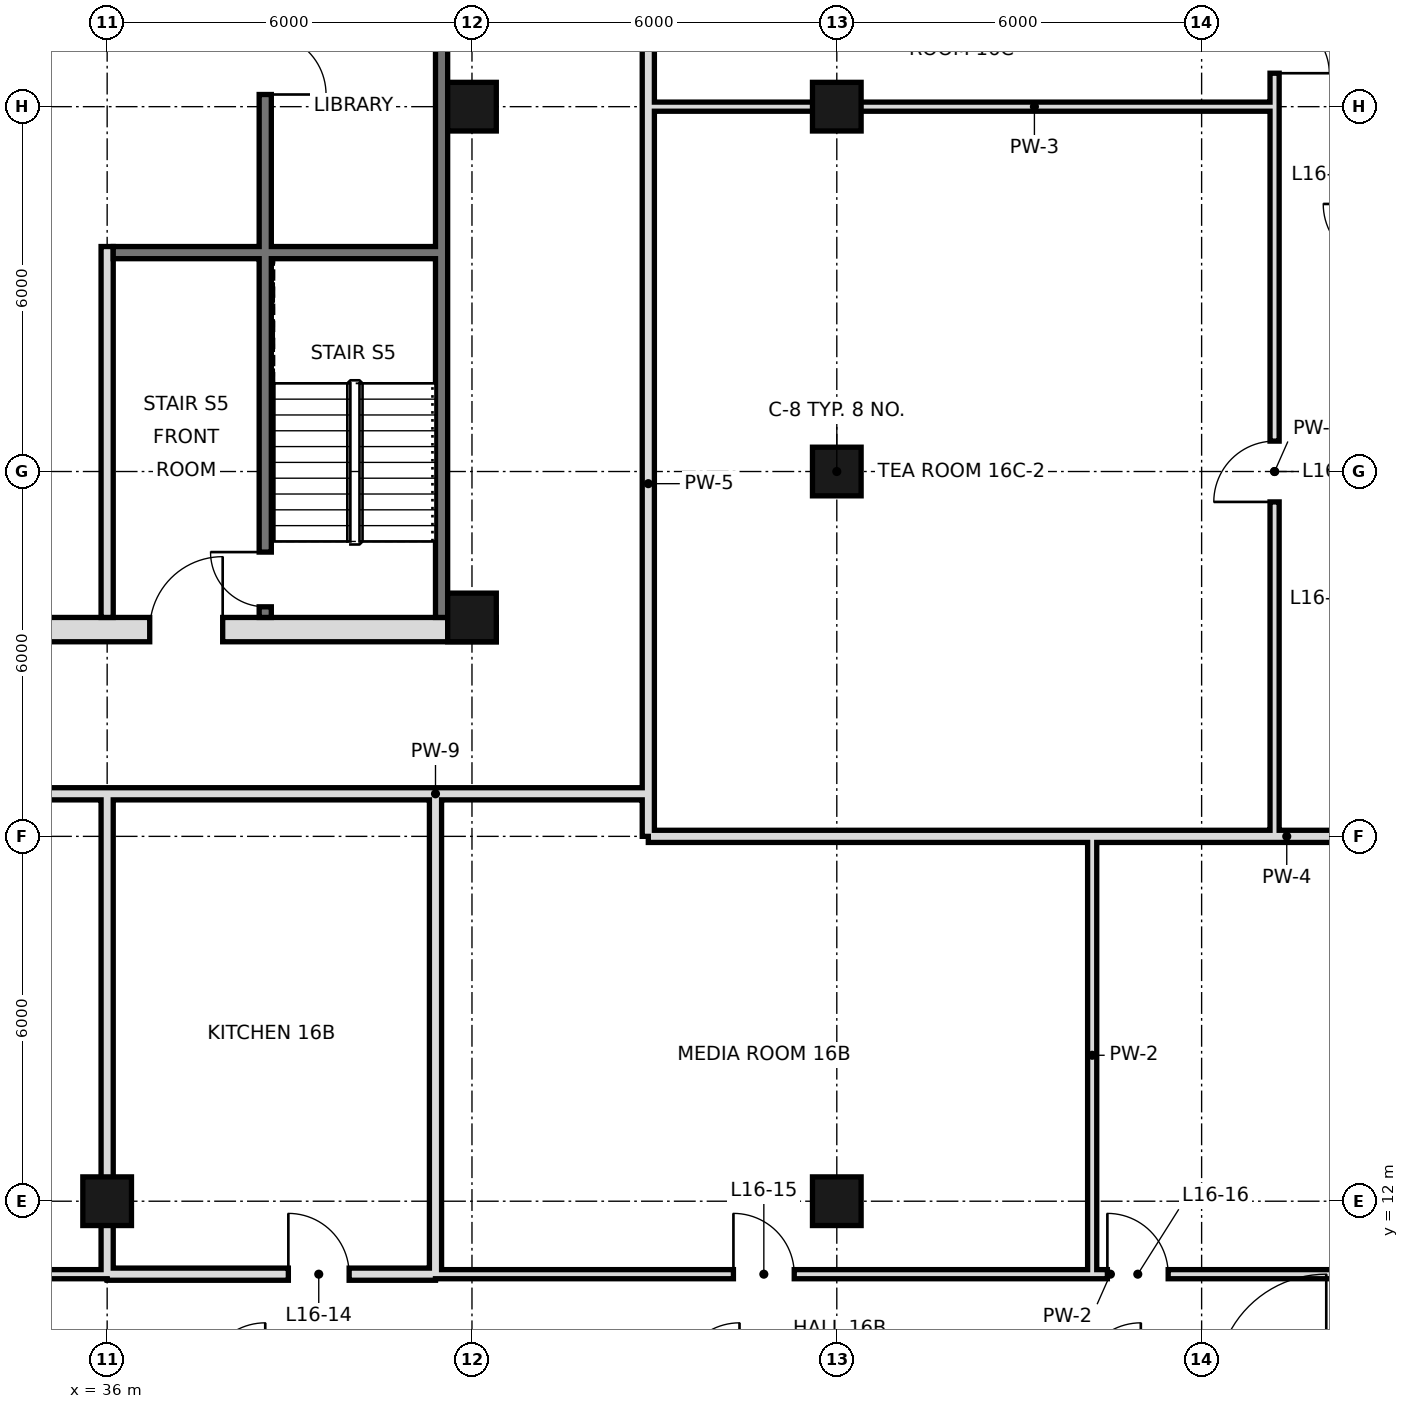
"""IFC4 building model, lengths in metres.
Left out: names, types, materials, properties, quantities, classifications, styles, units other than length and angle.
Written with IfcOpenShell. Run it as: python <this file> out.ifc"""

import sys

from ifc_helpers import new_model, si_unit, direction, frame, frame_2d, origin, origin_2d, place, context, subcontext, project, spatial, rectangle, hollow_rectangle, extrude, element, fill, save


model = new_model("IFC4")
c1 = context("Model", 3, precision=1e-05, world=origin(), true_north=direction((0.0, 1.0)))
c2 = subcontext(c1, "Body", "Model", "MODEL_VIEW")
j1 = project(units=[si_unit("LENGTHUNIT", "METRE"), si_unit("PLANEANGLEUNIT", "RADIAN")], contexts=[c1])
p1 = place(None, origin())
s1 = spatial("IfcSite", under=j1, at=p1, CompositionType="ELEMENT")
p2 = place(p1, origin())
s2 = spatial("IfcBuilding", under=s1, at=p2, CompositionType="ELEMENT")
p3 = place(p2, frame((0.0, 0.0, 78.6)))
s3 = spatial("IfcBuildingStorey", under=s2, at=p3, CompositionType="ELEMENT", Elevation=78.6)
p4 = place(p3, frame((36.0, 12.0, 0.0), z_axis=(0.0, 0.0, 1.0), x_axis=(1.0, 0.0, 0.0)))
e1 = element("IfcColumn", 1, at=p4, inside=s3, PredefinedType="COLUMN", context=c2, shape_type="SweptSolid", body=[
    extrude(hollow_rectangle(XDim=0.8, YDim=0.8, WallThickness=0.04, at=origin_2d()), origin(), (0.0, 0.0, 1.0), 3.6),
])
for number, where, z_axis, x_axis in (
    (2, (42.0, 21.6, 0.0), (0.0, 0.0, 1.0), (1.0, 0.0, 0.0)),
    (3, (42.0, 30.0, 0.0), (0.0, 0.0, 1.0), (1.0, 0.0, 0.0)),
):
    element("IfcColumn", number, at=place(p3, frame(where, z_axis=z_axis, x_axis=x_axis)), inside=s3, PredefinedType="COLUMN", context=c2, shape_type="SweptSolid", body=[
        extrude(hollow_rectangle(XDim=0.8, YDim=0.8, WallThickness=0.06, at=origin_2d()), origin(), (0.0, 0.0, 1.0), 3.6),
    ])
for number, where, z_axis, x_axis in (
    (4, (48.0, 12.0, 0.0), (0.0, 0.0, 1.0), (1.0, 0.0, 0.0)),
    (5, (48.0, 24.0, 0.0), (0.0, 0.0, 1.0), (1.0, 0.0, 0.0)),
    (6, (48.0, 30.0, 0.0), (0.0, 0.0, 1.0), (1.0, 0.0, 0.0)),
):
    element("IfcColumn", number, at=place(p3, frame(where, z_axis=z_axis, x_axis=x_axis)), inside=s3, PredefinedType="COLUMN", context=c2, shape_type="SweptSolid", body=[
        extrude(hollow_rectangle(XDim=0.8, YDim=0.8, WallThickness=0.04, at=origin_2d()), origin(), (0.0, 0.0, 1.0), 3.6),
    ])
for number, where, z_axis, x_axis in (
    (7, (36.0, 10.8, 0.0), (0.0, 0.0, 1.0), (0.0, 1.0, 0.0)),
    (8, (41.4, 10.8, 0.0), (0.0, 0.0, 1.0), (0.0, 1.0, 0.0)),
):
    element("IfcWall", number, at=place(p3, frame(where, z_axis=z_axis, x_axis=x_axis)), inside=s3, PredefinedType="SOLIDWALL", context=c2, shape_type="SweptSolid", body=[
        extrude(rectangle(XDim=7.9, YDim=0.2, at=frame_2d((3.95, 0.0))), origin(), (0.0, 0.0, 1.0), 2.72),
    ])
p5 = place(p3, frame((44.9, 18.7, 0.0), z_axis=(0.0, 0.0, 1.0), x_axis=(0.0, 1.0, 0.0)))
e9 = element("IfcWall", 9, at=p5, inside=s3, PredefinedType="SOLIDWALL", context=c2, shape_type="SweptSolid", body=[
    extrude(rectangle(XDim=13.7, YDim=0.2, at=frame_2d((6.85, 0.0))), origin(), (0.0, 0.0, 1.0), 2.97),
])
p6 = place(p3, frame((44.9, 18.0, 0.0), z_axis=(0.0, 0.0, 1.0), x_axis=(0.0, 1.0, 0.0)))
e10 = element("IfcWall", 10, at=p6, inside=s3, PredefinedType="SOLIDWALL", context=c2, shape_type="SweptSolid", body=[
    extrude(rectangle(XDim=0.7, YDim=0.2, at=frame_2d((0.35, 0.0))), origin(), (0.0, 0.0, 1.0), 2.97),
])
p7 = place(p3, frame((52.2, 10.8, 0.0), z_axis=(0.0, 0.0, 1.0), x_axis=(0.0, 1.0, 0.0)))
e11 = element("IfcWall", 11, at=p7, inside=s3, PredefinedType="PARTITIONING", context=c2, shape_type="SweptSolid", body=[
    extrude(rectangle(XDim=7.2, YDim=0.15, at=frame_2d((3.6, 0.0))), origin(), (0.0, 0.0, 1.0), 3.42),
])
p8 = place(p3, frame((55.2, 18.0, 0.0), z_axis=(0.0, 0.0, 1.0), x_axis=(0.0, 1.0, 0.0)))
e12 = element("IfcWall", 12, at=p8, inside=s3, PredefinedType="PARTITIONING", context=c2, shape_type="SweptSolid", body=[
    extrude(rectangle(XDim=12.0, YDim=0.15, at=frame_2d((6.0, 0.0))), origin(), (0.0, 0.0, 1.0), 3.42),
])
p9 = place(p8, frame((5.5, 0.0, 0.0)))
e13 = element("IfcOpeningElement", 13, at=p9, cuts=e12, PredefinedType="OPENING", context=c2, shape_type="SweptSolid", body=[
    extrude(rectangle(XDim=1.0, YDim=2.4, at=frame_2d((0.5, 1.2))), frame((0.0, 0.085, 0.0), z_axis=(0.0, -1.0, 0.0), x_axis=(1.0, 0.0, 0.0)), (0.0, 0.0, 1.0), 0.17),
])
p10 = place(p3, frame((55.2, 30.0, 0.0), z_axis=(0.0, 0.0, 1.0), x_axis=(0.0, 1.0, 0.0)))
e14 = element("IfcWall", 14, at=p10, inside=s3, PredefinedType="PARTITIONING", context=c2, shape_type="SweptSolid", body=[
    extrude(rectangle(XDim=2.4, YDim=0.15, at=frame_2d((1.2, 0.0))), origin(), (0.0, 0.0, 1.0), 3.42),
])
p11 = place(p10, frame((0.55, 0.0, 0.0)))
e15 = element("IfcOpeningElement", 15, at=p11, cuts=e14, PredefinedType="OPENING", context=c2, shape_type="SweptSolid", body=[
    extrude(rectangle(XDim=0.9, YDim=2.4, at=frame_2d((0.45, 1.2))), frame((0.0, 0.085, 0.0), z_axis=(0.0, -1.0, 0.0), x_axis=(1.0, 0.0, 0.0)), (0.0, 0.0, 1.0), 0.17),
])
p12 = place(p3, frame((36.0, 10.8, 0.0), z_axis=(0.0, 0.0, 1.0), x_axis=(1.0, 0.0, 0.0)))
e16 = element("IfcWall", 16, at=p12, inside=s3, PredefinedType="SOLIDWALL", context=c2, shape_type="SweptSolid", body=[
    extrude(rectangle(XDim=5.4, YDim=0.2, at=frame_2d((2.7, 0.0))), origin(), (0.0, 0.0, 1.0), 2.72),
])
p13 = place(p12, frame((2.98, 0.0, 0.0)))
e17 = element("IfcOpeningElement", 17, at=p13, cuts=e16, PredefinedType="OPENING", context=c2, shape_type="SweptSolid", body=[
    extrude(rectangle(XDim=1.0, YDim=2.4, at=frame_2d((0.5, 1.2))), frame((0.0, 0.11, 0.0), z_axis=(0.0, -1.0, 0.0), x_axis=(1.0, 0.0, 0.0)), (0.0, 0.0, 1.0), 0.22),
])
p14 = place(p3, frame((6.6, 10.8, 0.0), z_axis=(0.0, 0.0, 1.0), x_axis=(1.0, 0.0, 0.0)))
e18 = element("IfcWall", 18, at=p14, inside=s3, PredefinedType="PARTITIONING", context=c2, shape_type="SweptSolid", body=[
    extrude(rectangle(XDim=29.4, YDim=0.15, at=frame_2d((14.7, 0.0))), origin(), (0.0, 0.0, 1.0), 3.42),
])
p15 = place(p14, frame((2.5, 0.0, 0.0)))
e19 = element("IfcOpeningElement", 19, at=p15, cuts=e18, PredefinedType="OPENING", context=c2, shape_type="SweptSolid", body=[
    extrude(rectangle(XDim=1.0, YDim=2.4, at=frame_2d((0.5, 1.2))), frame((0.0, 0.085, 0.0), z_axis=(0.0, -1.0, 0.0), x_axis=(1.0, 0.0, 0.0)), (0.0, 0.0, 1.0), 0.17),
])
p16 = place(p14, frame((7.96, 0.0, 0.0)))
e20 = element("IfcOpeningElement", 20, at=p16, cuts=e18, PredefinedType="OPENING", context=c2, shape_type="SweptSolid", body=[
    extrude(rectangle(XDim=1.0, YDim=2.4, at=frame_2d((0.5, 1.2))), frame((0.0, 0.085, 0.0), z_axis=(0.0, -1.0, 0.0), x_axis=(1.0, 0.0, 0.0)), (0.0, 0.0, 1.0), 0.17),
])
p17 = place(p14, frame((19.54, 0.0, 0.0)))
e21 = element("IfcOpeningElement", 21, at=p17, cuts=e18, PredefinedType="OPENING", context=c2, shape_type="SweptSolid", body=[
    extrude(rectangle(XDim=1.0, YDim=2.4, at=frame_2d((0.5, 1.2))), frame((0.0, 0.085, 0.0), z_axis=(0.0, -1.0, 0.0), x_axis=(1.0, 0.0, 0.0)), (0.0, 0.0, 1.0), 0.17),
])
p18 = place(p14, frame((26.8, 0.0, 0.0)))
e22 = element("IfcOpeningElement", 22, at=p18, cuts=e18, PredefinedType="OPENING", context=c2, shape_type="SweptSolid", body=[
    extrude(rectangle(XDim=1.0, YDim=2.4, at=frame_2d((0.5, 1.2))), frame((0.0, 0.085, 0.0), z_axis=(0.0, -1.0, 0.0), x_axis=(1.0, 0.0, 0.0)), (0.0, 0.0, 1.0), 0.17),
])
p19 = place(p3, frame((41.4, 10.8, 0.0), z_axis=(0.0, 0.0, 1.0), x_axis=(1.0, 0.0, 0.0)))
e23 = element("IfcWall", 23, at=p19, inside=s3, PredefinedType="PARTITIONING", context=c2, shape_type="SweptSolid", body=[
    extrude(rectangle(XDim=22.2, YDim=0.15, at=frame_2d((11.1, 0.0))), origin(), (0.0, 0.0, 1.0), 3.42),
])
p20 = place(p19, frame((4.9, 0.0, 0.0)))
e24 = element("IfcOpeningElement", 24, at=p20, cuts=e23, PredefinedType="OPENING", context=c2, shape_type="SweptSolid", body=[
    extrude(rectangle(XDim=1.0, YDim=2.4, at=frame_2d((0.5, 1.2))), frame((0.0, 0.085, 0.0), z_axis=(0.0, -1.0, 0.0), x_axis=(1.0, 0.0, 0.0)), (0.0, 0.0, 1.0), 0.17),
])
p21 = place(p19, frame((11.05, 0.0, 0.0)))
e25 = element("IfcOpeningElement", 25, at=p21, cuts=e23, PredefinedType="OPENING", context=c2, shape_type="SweptSolid", body=[
    extrude(rectangle(XDim=1.0, YDim=2.4, at=frame_2d((0.5, 1.2))), frame((0.0, 0.085, 0.0), z_axis=(0.0, -1.0, 0.0), x_axis=(1.0, 0.0, 0.0)), (0.0, 0.0, 1.0), 0.17),
])
p22 = place(p3, frame((44.9, 18.0, 0.0), z_axis=(0.0, 0.0, 1.0), x_axis=(1.0, 0.0, 0.0)))
e26 = element("IfcWall", 26, at=p22, inside=s3, PredefinedType="SOLIDWALL", context=c2, shape_type="SweptSolid", body=[
    extrude(rectangle(XDim=21.7, YDim=0.2, at=frame_2d((10.85, 0.0))), origin(), (0.0, 0.0, 1.0), 2.52),
])
p23 = place(p3, frame((6.6, 18.7, 0.0), z_axis=(0.0, 0.0, 1.0), x_axis=(1.0, 0.0, 0.0)))
e27 = element("IfcWall", 27, at=p23, inside=s3, PredefinedType="SOLIDWALL", context=c2, shape_type="SweptSolid", body=[
    extrude(rectangle(XDim=29.4, YDim=0.2, at=frame_2d((14.7, 0.0))), origin(), (0.0, 0.0, 1.0), 2.72),
])
p24 = place(p23, frame((1.54, 0.0, 0.0)))
e28 = element("IfcOpeningElement", 28, at=p24, cuts=e27, PredefinedType="OPENING", context=c2, shape_type="SweptSolid", body=[
    extrude(rectangle(XDim=1.2, YDim=2.4, at=frame_2d((0.6, 1.2))), frame((0.0, 0.11, 0.0), z_axis=(0.0, -1.0, 0.0), x_axis=(1.0, 0.0, 0.0)), (0.0, 0.0, 1.0), 0.22),
])
p25 = place(p23, frame((24.94, 0.0, 0.0)))
e29 = element("IfcOpeningElement", 29, at=p25, cuts=e27, PredefinedType="OPENING", context=c2, shape_type="SweptSolid", body=[
    extrude(rectangle(XDim=1.2, YDim=2.4, at=frame_2d((0.6, 1.2))), frame((0.0, 0.11, 0.0), z_axis=(0.0, -1.0, 0.0), x_axis=(1.0, 0.0, 0.0)), (0.0, 0.0, 1.0), 0.22),
])
p26 = place(p3, frame((41.4, 18.7, 0.0), z_axis=(0.0, 0.0, 1.0), x_axis=(1.0, 0.0, 0.0)))
e30 = element("IfcWall", 30, at=p26, inside=s3, PredefinedType="SOLIDWALL", context=c2, shape_type="SweptSolid", body=[
    extrude(rectangle(XDim=3.5, YDim=0.2, at=frame_2d((1.75, 0.0))), origin(), (0.0, 0.0, 1.0), 2.72),
])
p27 = place(p3, frame((36.0, 18.7, 0.0), z_axis=(0.0, 0.0, 1.0), x_axis=(1.0, 0.0, 0.0)))
e31 = element("IfcWall", 31, at=p27, inside=s3, PredefinedType="SOLIDWALL", context=c2, shape_type="SweptSolid", body=[
    extrude(rectangle(XDim=5.4, YDim=0.2, at=frame_2d((2.7, 0.0))), origin(), (0.0, 0.0, 1.0), 3.42),
])
p28 = place(p3, frame((44.9, 30.0, 0.0), z_axis=(0.0, 0.0, 1.0), x_axis=(1.0, 0.0, 0.0)))
e32 = element("IfcWall", 32, at=p28, inside=s3, PredefinedType="PARTITIONING", context=c2, shape_type="SweptSolid", body=[
    extrude(rectangle(XDim=10.3, YDim=0.15, at=frame_2d((5.15, 0.0))), origin(), (0.0, 0.0, 1.0), 2.52),
])
p29 = place(p3, frame((41.5, 21.6, 0.0), z_axis=(0.0, 0.0, 1.0), x_axis=(0.0, 1.0, 0.0)))
e33 = element("IfcWall", 33, at=p29, inside=s3, PredefinedType="SOLIDWALL", context=c2, shape_type="SweptSolid", body=[
    extrude(rectangle(XDim=23.5, YDim=0.2, at=frame_2d((11.75, 0.0))), origin(), (0.0, 0.0, 1.0), 3.42),
])
p30 = place(p3, frame((5.6, 21.4, 0.0), z_axis=(0.0, 0.0, 1.0), x_axis=(1.0, 0.0, 0.0)))
e34 = element("IfcWall", 34, at=p30, inside=s3, PredefinedType="SOLIDWALL", context=c2, shape_type="SweptSolid", body=[
    extrude(rectangle(XDim=36.8, YDim=0.4, at=frame_2d((18.4, 0.0))), origin(), (0.0, 0.0, 1.0), 3.42),
])
p31 = place(p30, frame((8.5, 0.0, 0.0)))
e35 = element("IfcOpeningElement", 35, at=p31, cuts=e34, PredefinedType="OPENING", context=c2, shape_type="SweptSolid", body=[
    extrude(rectangle(XDim=1.8, YDim=2.1, at=frame_2d((0.9, 1.05))), frame((0.0, 0.21, 0.0), z_axis=(0.0, -1.0, 0.0), x_axis=(1.0, 0.0, 0.0)), (0.0, 0.0, 1.0), 0.42),
])
p32 = place(p30, frame((17.5, 0.0, 0.0)))
e36 = element("IfcOpeningElement", 36, at=p32, cuts=e34, PredefinedType="OPENING", context=c2, shape_type="SweptSolid", body=[
    extrude(rectangle(XDim=1.8, YDim=2.1, at=frame_2d((0.9, 1.05))), frame((0.0, 0.21, 0.0), z_axis=(0.0, -1.0, 0.0), x_axis=(1.0, 0.0, 0.0)), (0.0, 0.0, 1.0), 0.42),
])
p33 = place(p30, frame((26.5, 0.0, 0.0)))
e37 = element("IfcOpeningElement", 37, at=p33, cuts=e34, PredefinedType="OPENING", context=c2, shape_type="SweptSolid", body=[
    extrude(rectangle(XDim=1.8, YDim=2.1, at=frame_2d((0.9, 1.05))), frame((0.0, 0.21, 0.0), z_axis=(0.0, -1.0, 0.0), x_axis=(1.0, 0.0, 0.0)), (0.0, 0.0, 1.0), 0.42),
])
p34 = place(p30, frame((4.5, 0.0, 0.0)))
e38 = element("IfcOpeningElement", 38, at=p34, cuts=e34, PredefinedType="OPENING", context=c2, shape_type="SweptSolid", body=[
    extrude(rectangle(XDim=1.2, YDim=2.1, at=frame_2d((0.6, 1.05))), frame((0.0, 0.21, 0.0), z_axis=(0.0, -1.0, 0.0), x_axis=(1.0, 0.0, 0.0)), (0.0, 0.0, 1.0), 0.42),
])
p35 = place(p30, frame((31.1, 0.0, 0.0)))
e39 = element("IfcOpeningElement", 39, at=p35, cuts=e34, PredefinedType="OPENING", context=c2, shape_type="SweptSolid", body=[
    extrude(rectangle(XDim=1.2, YDim=2.1, at=frame_2d((0.6, 1.05))), frame((0.0, 0.21, 0.0), z_axis=(0.0, -1.0, 0.0), x_axis=(1.0, 0.0, 0.0)), (0.0, 0.0, 1.0), 0.42),
])
p36 = place(p3, frame((36.0, 21.6, 0.0), z_axis=(0.0, 0.0, 1.0), x_axis=(0.0, 1.0, 0.0)))
e40 = element("IfcWall", 40, at=p36, inside=s3, PredefinedType="PARTITIONING", context=c2, shape_type="SweptSolid", body=[
    extrude(rectangle(XDim=6.1, YDim=0.2, at=frame_2d((3.05, 0.0))), origin(), (0.0, 0.0, 1.0), 3.42),
])
p37 = place(p3, frame((38.6, 21.6, 0.0), z_axis=(0.0, 0.0, 1.0), x_axis=(0.0, 1.0, 0.0)))
e41 = element("IfcWall", 41, at=p37, inside=s3, PredefinedType="SOLIDWALL", context=c2, shape_type="SweptSolid", body=[
    extrude(rectangle(XDim=23.4, YDim=0.2, at=frame_2d((11.7, 0.0))), origin(), (0.0, 0.0, 1.0), 3.42),
])
p38 = place(p37, frame((8.6, 0.0, 0.0)))
e42 = element("IfcOpeningElement", 42, at=p38, cuts=e41, PredefinedType="OPENING", context=c2, shape_type="SweptSolid", body=[
    extrude(rectangle(XDim=1.0, YDim=2.1, at=frame_2d((0.5, 1.05))), frame((0.0, 0.11, 0.0), z_axis=(0.0, -1.0, 0.0), x_axis=(1.0, 0.0, 0.0)), (0.0, 0.0, 1.0), 0.22),
])
p39 = place(p37, frame((13.25, 0.0, 0.0)))
e43 = element("IfcOpeningElement", 43, at=p39, cuts=e41, PredefinedType="OPENING", context=c2, shape_type="SweptSolid", body=[
    extrude(rectangle(XDim=1.0, YDim=2.1, at=frame_2d((0.5, 1.05))), frame((0.0, 0.11, 0.0), z_axis=(0.0, -1.0, 0.0), x_axis=(1.0, 0.0, 0.0)), (0.0, 0.0, 1.0), 0.22),
])
p40 = place(p37, frame((15.7, 0.0, 0.0)))
e44 = element("IfcOpeningElement", 44, at=p40, cuts=e41, PredefinedType="OPENING", context=c2, shape_type="SweptSolid", body=[
    extrude(rectangle(XDim=1.0, YDim=2.1, at=frame_2d((0.5, 1.05))), frame((0.0, 0.11, 0.0), z_axis=(0.0, -1.0, 0.0), x_axis=(1.0, 0.0, 0.0)), (0.0, 0.0, 1.0), 0.22),
])
p41 = place(p37, frame((0.175, 0.0, 0.0)))
e45 = element("IfcOpeningElement", 45, at=p41, cuts=e41, PredefinedType="OPENING", context=c2, shape_type="SweptSolid", body=[
    extrude(rectangle(XDim=0.9, YDim=2.1, at=frame_2d((0.45, 1.05))), frame((0.0, 0.11, 0.0), z_axis=(0.0, -1.0, 0.0), x_axis=(1.0, 0.0, 0.0)), (0.0, 0.0, 1.0), 0.22),
])
p42 = place(p3, frame((36.1, 27.6, 0.0), z_axis=(0.0, 0.0, 1.0), x_axis=(1.0, 0.0, 0.0)))
e46 = element("IfcWall", 46, at=p42, inside=s3, PredefinedType="SOLIDWALL", context=c2, shape_type="SweptSolid", body=[
    extrude(rectangle(XDim=5.3, YDim=0.2, at=frame_2d((2.65, 0.0))), origin(), (0.0, 0.0, 1.0), 3.42),
])
p43 = place(p13, origin())
e47 = element("IfcDoor", 47, at=p43, inside=s3, OperationType="SINGLE_SWING_LEFT", PredefinedType="DOOR", context=c2, shape_type="SweptSolid", body=[
    extrude(rectangle(XDim=1.0, YDim=2.4, at=frame_2d((0.5, 1.2))), frame((0.0, 0.025, 0.0), z_axis=(0.0, -1.0, 0.0), x_axis=(1.0, 0.0, 0.0)), (0.0, 0.0, 1.0), 0.05),
])
fill(e17, e47)
p44 = place(p20, origin())
e48 = element("IfcDoor", 48, at=p44, inside=s3, OperationType="SINGLE_SWING_LEFT", PredefinedType="DOOR", context=c2, shape_type="SweptSolid", body=[
    extrude(rectangle(XDim=1.0, YDim=2.4, at=frame_2d((0.5, 1.2))), frame((0.0, 0.025, 0.0), z_axis=(0.0, -1.0, 0.0), x_axis=(1.0, 0.0, 0.0)), (0.0, 0.0, 1.0), 0.05),
])
fill(e24, e48)
p45 = place(p21, origin())
e49 = element("IfcDoor", 49, at=p45, inside=s3, OperationType="SINGLE_SWING_LEFT", PredefinedType="DOOR", context=c2, shape_type="SweptSolid", body=[
    extrude(rectangle(XDim=1.0, YDim=2.4, at=frame_2d((0.5, 1.2))), frame((0.0, 0.025, 0.0), z_axis=(0.0, -1.0, 0.0), x_axis=(1.0, 0.0, 0.0)), (0.0, 0.0, 1.0), 0.05),
])
fill(e25, e49)
p46 = place(p9, origin())
e50 = element("IfcDoor", 50, at=p46, inside=s3, OperationType="SINGLE_SWING_LEFT", PredefinedType="DOOR", context=c2, shape_type="SweptSolid", body=[
    extrude(rectangle(XDim=1.0, YDim=2.4, at=frame_2d((0.5, 1.2))), frame((0.0, 0.025, 0.0), z_axis=(0.0, -1.0, 0.0), x_axis=(1.0, 0.0, 0.0)), (0.0, 0.0, 1.0), 0.05),
])
fill(e13, e50)
p47 = place(p11, frame((0.9, 0.0, 0.0), z_axis=(0.0, 0.0, 1.0), x_axis=(-1.0, 0.0, 0.0)))
e51 = element("IfcDoor", 51, at=p47, inside=s3, OperationType="SINGLE_SWING_RIGHT", PredefinedType="DOOR", context=c2, shape_type="SweptSolid", body=[
    extrude(rectangle(XDim=0.9, YDim=2.4, at=frame_2d((0.45, 1.2))), frame((0.0, 0.025, 0.0), z_axis=(0.0, -1.0, 0.0), x_axis=(1.0, 0.0, 0.0)), (0.0, 0.0, 1.0), 0.05),
])
fill(e15, e51)
p48 = place(p35, frame((1.2, 0.0, 0.0), z_axis=(0.0, 0.0, 1.0), x_axis=(-1.0, 0.0, 0.0)))
e52 = element("IfcDoor", 52, at=p48, inside=s3, OperationType="SINGLE_SWING_LEFT", PredefinedType="DOOR", context=c2, shape_type="SweptSolid", body=[
    extrude(rectangle(XDim=1.2, YDim=2.1, at=frame_2d((0.6, 1.05))), frame((0.0, 0.025, 0.0), z_axis=(0.0, -1.0, 0.0), x_axis=(1.0, 0.0, 0.0)), (0.0, 0.0, 1.0), 0.05),
])
fill(e39, e52)
p49 = place(p38, frame((1.0, 0.0, 0.0), z_axis=(0.0, 0.0, 1.0), x_axis=(-1.0, 0.0, 0.0)))
e53 = element("IfcDoor", 53, at=p49, inside=s3, OperationType="SINGLE_SWING_RIGHT", PredefinedType="DOOR", context=c2, shape_type="SweptSolid", body=[
    extrude(rectangle(XDim=1.0, YDim=2.1, at=frame_2d((0.5, 1.05))), frame((0.0, 0.025, 0.0), z_axis=(0.0, -1.0, 0.0), x_axis=(1.0, 0.0, 0.0)), (0.0, 0.0, 1.0), 0.05),
])
fill(e42, e53)
p50 = place(p41, frame((0.9, 0.0, 0.0), z_axis=(0.0, 0.0, 1.0), x_axis=(-1.0, 0.0, 0.0)))
e54 = element("IfcDoor", 54, at=p50, inside=s3, OperationType="SINGLE_SWING_LEFT", PredefinedType="DOOR", context=c2, shape_type="SweptSolid", body=[
    extrude(rectangle(XDim=0.9, YDim=2.1, at=frame_2d((0.45, 1.05))), frame((0.0, 0.025, 0.0), z_axis=(0.0, -1.0, 0.0), x_axis=(1.0, 0.0, 0.0)), (0.0, 0.0, 1.0), 0.05),
])
fill(e45, e54)
save(model, sys.argv[1])
